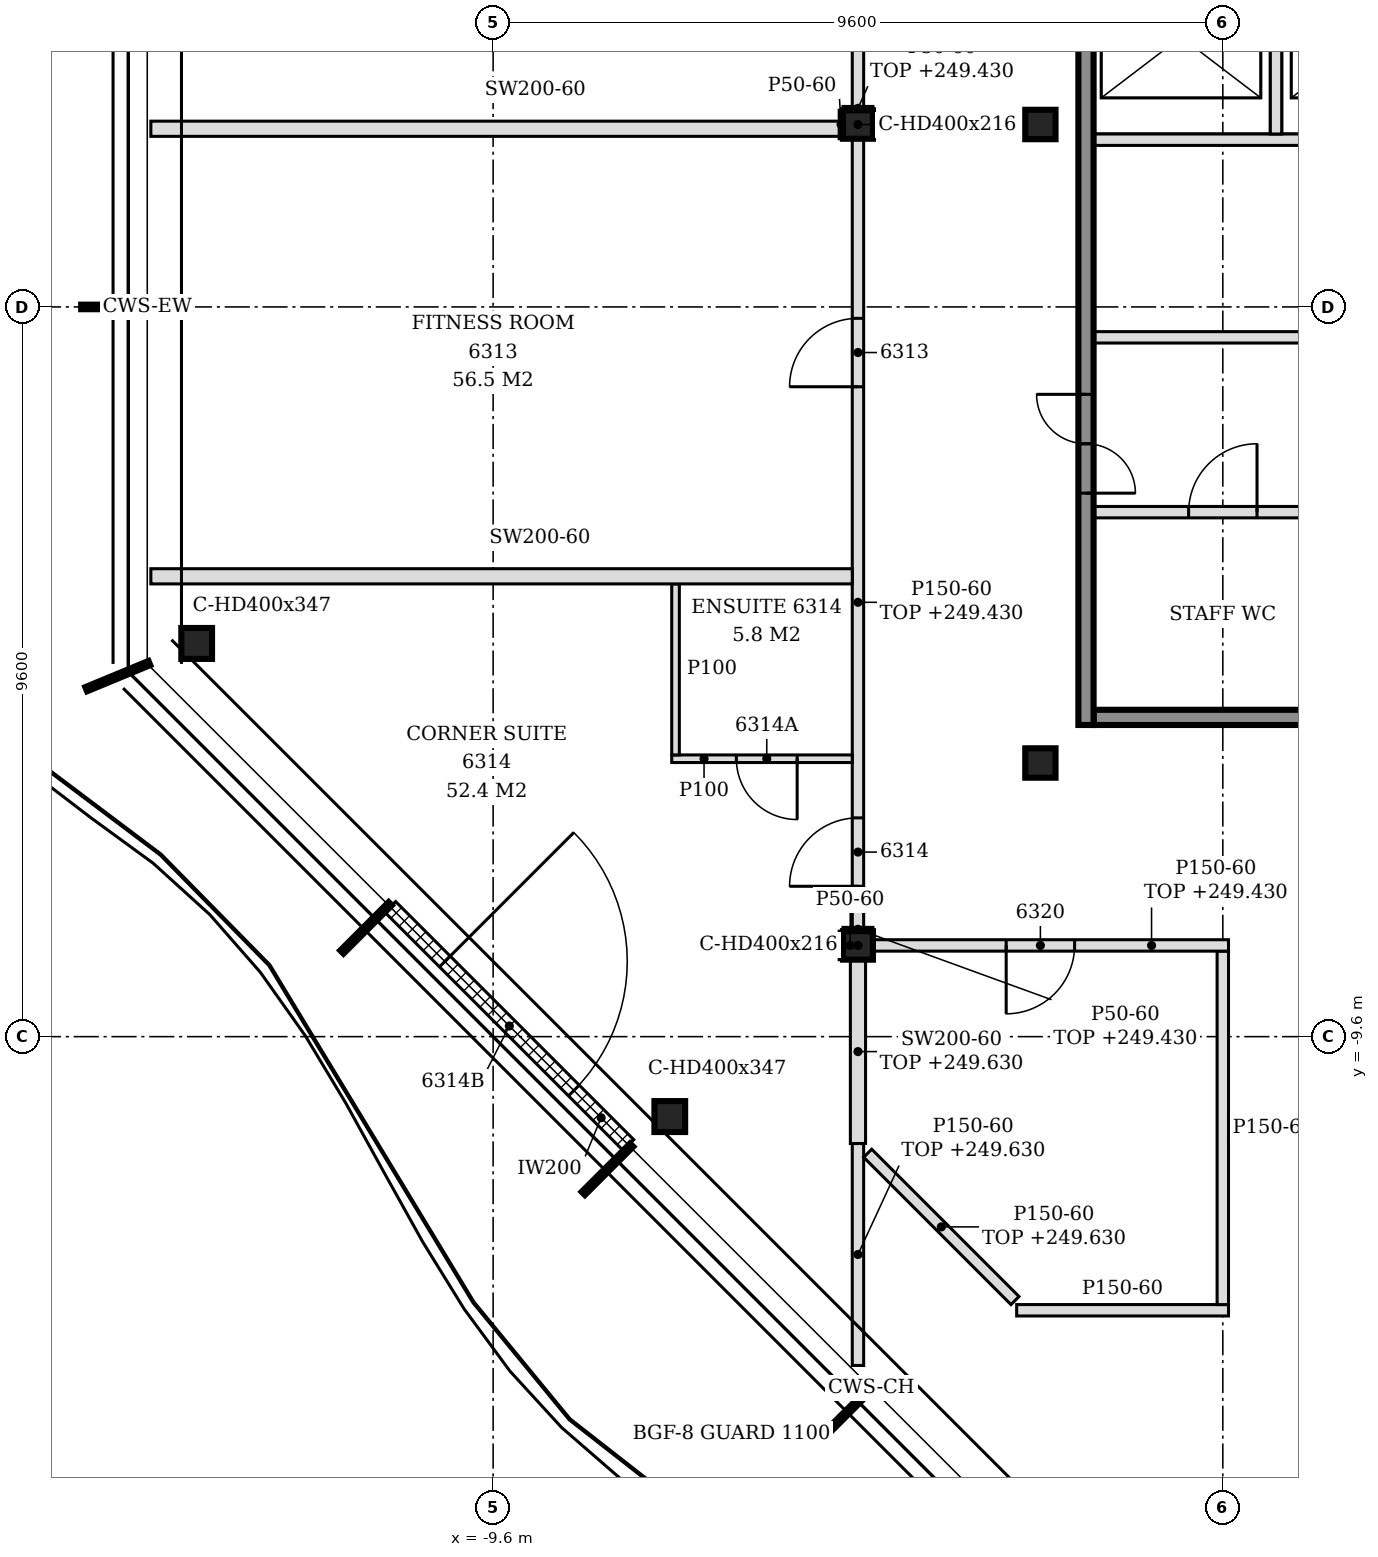
"""IFC4 building model, lengths in metres.
Left out: names, types, materials, properties, quantities, classifications, styles, units other than length and angle.
Written with IfcOpenShell. Run it as: python <this file> out.ifc"""

import sys

from ifc_helpers import new_model, si_unit, direction, frame, frame_2d, origin, origin_2d, place, context, subcontext, project, spatial, polyline, rectangle, i_section, outline, extrude, element, fill, save


model = new_model("IFC4")
c1 = context("Model", 3, precision=1e-05, world=origin(), true_north=direction((0.0, 1.0)))
c2 = subcontext(c1, "Body", "Model", "MODEL_VIEW")
j1 = project(units=[si_unit("LENGTHUNIT", "METRE"), si_unit("PLANEANGLEUNIT", "RADIAN")], contexts=[c1])
p1 = place(None, origin())
s1 = spatial("IfcSite", under=j1, at=p1, CompositionType="ELEMENT")
p2 = place(p1, origin())
s2 = spatial("IfcBuilding", under=s1, at=p2, CompositionType="ELEMENT")
p3 = place(p2, frame((0.0, 0.0, 246.6)))
s3 = spatial("IfcBuildingStorey", under=s2, at=p3, CompositionType="ELEMENT", Elevation=246.6)
for number, where, z_axis, x_axis in (
    (1, (-13.5, -4.427, -0.15), (0.0, 0.0, 1.0), (1.0, 0.0, 0.0)),
    (2, (-7.276, -10.652, -0.15), (0.0, 0.0, 1.0), (1.0, 0.0, 0.0)),
):
    element("IfcColumn", number, at=place(p3, frame(where, z_axis=z_axis, x_axis=x_axis)), inside=s3, PredefinedType="COLUMN", context=c2, shape_type="SweptSolid", body=[
        extrude(i_section(OverallWidth=0.404, OverallDepth=0.407, WebThickness=0.027, FlangeThickness=0.044, FilletRadius=0.015, at=origin_2d()), origin(), (0.0, 0.0, 1.0), 3.6),
    ])
for number, where, z_axis, x_axis in (
    (3, (-4.8, -8.4, -0.15), (0.0, 0.0, 1.0), (1.0, 0.0, 0.0)),
    (4, (-4.8, 2.4, -0.15), (0.0, 0.0, 1.0), (1.0, 0.0, 0.0)),
):
    element("IfcColumn", number, at=place(p3, frame(where, z_axis=z_axis, x_axis=x_axis)), inside=s3, PredefinedType="COLUMN", context=c2, shape_type="SweptSolid", body=[
        extrude(i_section(OverallWidth=0.394, OverallDepth=0.375, WebThickness=0.017, FlangeThickness=0.028, FilletRadius=0.015, at=origin_2d()), origin(), (0.0, 0.0, 1.0), 3.6),
    ])
for number, where, z_axis, x_axis in (
    (5, (-2.4, -6.0, -0.15), (0.0, 0.0, 1.0), (1.0, 0.0, 0.0)),
    (6, (-2.4, 2.4, -0.15), (0.0, 0.0, 1.0), (1.0, 0.0, 0.0)),
):
    element("IfcColumn", number, at=place(p3, frame(where, z_axis=z_axis, x_axis=x_axis)), inside=s3, PredefinedType="COLUMN", context=c2, shape_type="SweptSolid", body=[
        extrude(i_section(OverallWidth=0.398, OverallDepth=0.387, WebThickness=0.021, FlangeThickness=0.033, FilletRadius=0.015, at=origin_2d()), origin(), (0.0, 0.0, 1.0), 3.6),
    ])
p4 = place(p3, frame((-10.953, -7.893, 0.0), z_axis=(0.0, 0.0, 1.0), x_axis=(0.707106781187, -0.707106781187, 0.0)))
e7 = element("IfcWall", 7, at=p4, inside=s3, PredefinedType="NOTDEFINED", context=c2, shape_type="SweptSolid", body=[
    extrude(rectangle(XDim=4.431, YDim=0.2, at=frame_2d((2.215, 0.0))), origin(), (0.0, 0.0, 1.0), 3.45),
])
p5 = place(p4, frame((1.015, 0.0, 0.0)))
e8 = element("IfcOpeningElement", 8, at=p5, cuts=e7, PredefinedType="OPENING", context=c2, shape_type="SweptSolid", body=[
    extrude(rectangle(XDim=2.4, YDim=2.4, at=frame_2d((1.2, 1.2))), frame((0.0, 0.11, 0.0), z_axis=(0.0, -1.0, 0.0), x_axis=(1.0, 0.0, 0.0)), (0.0, 0.0, 1.0), 0.22),
])
p6 = place(p3, frame((-1.7, -5.4, 0.0), z_axis=(0.0, 0.0, 1.0), x_axis=(1.0, 0.0, 0.0)))
e9 = element("IfcWall", 9, at=p6, inside=s3, PredefinedType="SOLIDWALL", context=c2, shape_type="SweptSolid", body=[
    extrude(rectangle(XDim=7.9, YDim=0.2, at=frame_2d((3.95, 0.0))), origin(), (0.0, 0.0, 1.0), 3.45),
])
p7 = place(p3, frame((-1.7, -2.7, 0.0), z_axis=(0.0, 0.0, 1.0), x_axis=(1.0, 0.0, 0.0)))
e10 = element("IfcWall", 10, at=p7, inside=s3, PredefinedType="PARTITIONING", context=c2, shape_type="SweptSolid", body=[
    extrude(rectangle(XDim=7.825, YDim=0.15, at=frame_2d((3.913, 0.0))), origin(), (0.0, 0.0, 1.0), 3.45),
])
p8 = place(p7, frame((1.25, 0.0, 0.0)))
e11 = element("IfcOpeningElement", 11, at=p8, cuts=e10, PredefinedType="OPENING", context=c2, shape_type="SweptSolid", body=[
    extrude(rectangle(XDim=0.9, YDim=2.1, at=frame_2d((0.45, 1.05))), frame((0.0, 0.085, 0.0), z_axis=(0.0, -1.0, 0.0), x_axis=(1.0, 0.0, 0.0)), (0.0, 0.0, 1.0), 0.17),
])
p9 = place(p7, frame((5.25, 0.0, 0.0)))
e12 = element("IfcOpeningElement", 12, at=p9, cuts=e10, PredefinedType="OPENING", context=c2, shape_type="SweptSolid", body=[
    extrude(rectangle(XDim=0.9, YDim=2.1, at=frame_2d((0.45, 1.05))), frame((0.0, 0.085, 0.0), z_axis=(0.0, -1.0, 0.0), x_axis=(1.0, 0.0, 0.0)), (0.0, 0.0, 1.0), 0.17),
])
p10 = place(p3, frame((-1.7, -0.4, 0.0), z_axis=(0.0, 0.0, 1.0), x_axis=(1.0, 0.0, 0.0)))
e13 = element("IfcWall", 13, at=p10, inside=s3, PredefinedType="PARTITIONING", context=c2, shape_type="SweptSolid", body=[
    extrude(rectangle(XDim=10.825, YDim=0.15, at=frame_2d((5.413, 0.0))), origin(), (0.0, 0.0, 1.0), 3.45),
])
p11 = place(p10, frame((4.95, 0.0, 0.0)))
e14 = element("IfcOpeningElement", 14, at=p11, cuts=e13, PredefinedType="OPENING", context=c2, shape_type="SweptSolid", body=[
    extrude(rectangle(XDim=0.9, YDim=2.1, at=frame_2d((0.45, 1.05))), frame((0.0, 0.085, 0.0), z_axis=(0.0, -1.0, 0.0), x_axis=(1.0, 0.0, 0.0)), (0.0, 0.0, 1.0), 0.17),
])
p12 = place(p3, frame((-1.7, 2.2, 0.0), z_axis=(0.0, 0.0, 1.0), x_axis=(1.0, 0.0, 0.0)))
e15 = element("IfcWall", 15, at=p12, inside=s3, PredefinedType="SOLIDWALL", context=c2, shape_type="SweptSolid", body=[
    extrude(rectangle(XDim=4.9, YDim=0.15, at=frame_2d((2.45, 0.0))), origin(), (0.0, 0.0, 1.0), 3.45),
])
p13 = place(p3, frame((-1.8, -5.5, 0.0), z_axis=(0.0, 0.0, 1.0), x_axis=(0.0, 1.0, 0.0)))
e16 = element("IfcWall", 16, at=p13, inside=s3, PredefinedType="SOLIDWALL", context=c2, shape_type="SweptSolid", body=[
    extrude(rectangle(XDim=15.8, YDim=0.2, at=frame_2d((7.9, 0.0))), origin(), (0.0, 0.0, 1.0), 3.45),
])
p14 = place(p13, frame((3.05, 0.0, 0.0)))
e17 = element("IfcOpeningElement", 17, at=p14, cuts=e16, PredefinedType="OPENING", context=c2, shape_type="SweptSolid", body=[
    extrude(rectangle(XDim=1.3, YDim=2.1, at=frame_2d((0.65, 1.05))), frame((0.0, 0.11, 0.0), z_axis=(0.0, -1.0, 0.0), x_axis=(1.0, 0.0, 0.0)), (0.0, 0.0, 1.0), 0.22),
])
p15 = place(p13, frame((11.45, 0.0, 0.0)))
e18 = element("IfcOpeningElement", 18, at=p15, cuts=e16, PredefinedType="OPENING", context=c2, shape_type="SweptSolid", body=[
    extrude(rectangle(XDim=1.3, YDim=2.1, at=frame_2d((0.65, 1.05))), frame((0.0, 0.11, 0.0), z_axis=(0.0, -1.0, 0.0), x_axis=(1.0, 0.0, 0.0)), (0.0, 0.0, 1.0), 0.22),
])
p16 = place(p3, frame((0.7, 2.275, 0.0), z_axis=(0.0, 0.0, 1.0), x_axis=(0.0, 1.0, 0.0)))
e19 = element("IfcWall", 19, at=p16, inside=s3, PredefinedType="SOLIDWALL", context=c2, shape_type="SweptSolid", body=[
    extrude(rectangle(XDim=2.55, YDim=0.15, at=frame_2d((1.275, 0.0))), origin(), (0.0, 0.0, 1.0), 3.45),
])
p17 = place(p3, frame((-4.8, -13.926, 0.0), z_axis=(0.0, 0.0, 1.0), x_axis=(0.0, 1.0, 0.0)))
e20 = element("IfcWall", 20, at=p17, inside=s3, PredefinedType="PARTITIONING", context=c2, shape_type="SweptSolid", body=[
    extrude(outline(polyline([(0.0, 0.0), (2.92, 0.0), (2.92, 3.03), (1.369, 3.03), (1.367, 2.63), (0.229, 2.63), (0.227, 3.03), (0.0, 3.03), (0.0, 0.0)])), frame((0.0, 0.075, 0.0), z_axis=(0.0, -1.0, 0.0), x_axis=(1.0, 0.0, 0.0)), (0.0, 0.0, 1.0), 0.15),
])
p18 = place(p3, frame((-2.712, -13.2, 0.0), z_axis=(0.0, 0.0, 1.0), x_axis=(1.0, 0.0, 0.0)))
e21 = element("IfcWall", 21, at=p18, inside=s3, PredefinedType="PARTITIONING", context=c2, shape_type="SweptSolid", body=[
    extrude(rectangle(XDim=2.787, YDim=0.15, at=frame_2d((1.394, 0.0))), origin(), (0.0, 0.0, 1.0), 3.45),
])
p19 = place(p3, frame((-2.734, -13.072, 0.0), z_axis=(0.0, 0.0, 1.0), x_axis=(-0.707151316332, 0.707062243236, 0.0)))
e22 = element("IfcWall", 22, at=p19, inside=s3, PredefinedType="PARTITIONING", context=c2, shape_type="SweptSolid", body=[
    extrude(rectangle(XDim=2.741, YDim=0.15, at=frame_2d((1.371, 0.0))), origin(), (0.0, 0.0, 1.0), 3.03),
])
p20 = place(p3, frame((0.0, -13.125, 0.0), z_axis=(0.0, 0.0, 1.0), x_axis=(0.0, 1.0, 0.0)))
e23 = element("IfcWall", 23, at=p20, inside=s3, PredefinedType="PARTITIONING", context=c2, shape_type="SweptSolid", body=[
    extrude(outline(polyline([(0.0, 0.0), (4.65, 0.0), (4.65, 2.83), (4.575, 2.83), (4.573, 3.45), (0.0, 3.45), (0.0, 0.0)])), frame((0.0, 0.075, 0.0), z_axis=(0.0, -1.0, 0.0), x_axis=(1.0, 0.0, 0.0)), (0.0, 0.0, 1.0), 0.15),
])
p21 = place(p3, frame((-4.8, -11.006, 0.0), z_axis=(0.0, 0.0, 1.0), x_axis=(0.0, 1.0, 0.0)))
e24 = element("IfcWall", 24, at=p21, inside=s3, PredefinedType="PARTITIONING", context=c2, shape_type="SweptSolid", body=[
    extrude(rectangle(XDim=2.419, YDim=0.2, at=frame_2d((1.209, 0.0))), origin(), (0.0, 0.0, 1.0), 3.03),
])
p22 = place(p3, frame((-4.603, -8.4, 0.0), z_axis=(0.0, 0.0, 1.0), x_axis=(1.0, 0.0, 0.0)))
e25 = element("IfcWall", 25, at=p22, inside=s3, PredefinedType="PARTITIONING", context=c2, shape_type="SweptSolid", body=[
    extrude(rectangle(XDim=4.678, YDim=0.15, at=frame_2d((2.339, 0.0))), origin(), (0.0, 0.0, 1.0), 2.83),
])
p23 = place(p22, frame((1.753, 0.0, 0.0)))
e26 = element("IfcOpeningElement", 26, at=p23, cuts=e25, PredefinedType="OPENING", context=c2, shape_type="SweptSolid", body=[
    extrude(rectangle(XDim=0.9, YDim=2.1, at=frame_2d((0.45, 1.05))), frame((0.0, 0.085, 0.0), z_axis=(0.0, -1.0, 0.0), x_axis=(1.0, 0.0, 0.0)), (0.0, 0.0, 1.0), 0.17),
])
p24 = place(p3, frame((-4.8, -8.212, 0.0), z_axis=(0.0, 0.0, 1.0), x_axis=(0.0, 1.0, 0.0)))
e27 = element("IfcWall", 27, at=p24, inside=s3, PredefinedType="PARTITIONING", context=c2, shape_type="SweptSolid", body=[
    extrude(rectangle(XDim=10.425, YDim=0.15, at=frame_2d((5.212, 0.0))), origin(), (0.0, 0.0, 1.0), 2.83),
])
p25 = place(p24, frame((7.163, 0.0, 0.0)))
e28 = element("IfcOpeningElement", 28, at=p25, cuts=e27, PredefinedType="OPENING", context=c2, shape_type="SweptSolid", body=[
    extrude(rectangle(XDim=0.9, YDim=2.1, at=frame_2d((0.45, 1.05))), frame((0.0, 0.085, 0.0), z_axis=(0.0, -1.0, 0.0), x_axis=(1.0, 0.0, 0.0)), (0.0, 0.0, 1.0), 0.17),
])
p26 = place(p24, frame((0.591, 0.0, 0.0)))
e29 = element("IfcOpeningElement", 29, at=p26, cuts=e27, PredefinedType="OPENING", context=c2, shape_type="SweptSolid", body=[
    extrude(rectangle(XDim=0.9, YDim=2.1, at=frame_2d((0.45, 1.05))), frame((0.0, 0.085, 0.0), z_axis=(0.0, -1.0, 0.0), x_axis=(1.0, 0.0, 0.0)), (0.0, 0.0, 1.0), 0.17),
])
p27 = place(p3, frame((-7.25, -5.944, 0.0), z_axis=(0.0, 0.0, 1.0), x_axis=(1.0, 0.0, 0.0)))
e30 = element("IfcWall", 30, at=p27, inside=s3, PredefinedType="PARTITIONING", context=c2, shape_type="SweptSolid", body=[
    extrude(outline(polyline([(0.0, 0.0), (2.375, 0.0), (2.375, 2.83), (2.3, 2.83), (2.298, 3.45), (0.0, 3.45), (0.0, 0.0)])), frame((0.0, 0.05, 0.0), z_axis=(0.0, -1.0, 0.0), x_axis=(1.0, 0.0, 0.0)), (0.0, 0.0, 1.0), 0.1),
])
p28 = place(p27, frame((0.85, 0.0, 0.0)))
e31 = element("IfcOpeningElement", 31, at=p28, cuts=e30, PredefinedType="OPENING", context=c2, shape_type="SweptSolid", body=[
    extrude(rectangle(XDim=0.8, YDim=2.1, at=frame_2d((0.4, 1.05))), frame((0.0, 0.06, 0.0), z_axis=(0.0, -1.0, 0.0), x_axis=(1.0, 0.0, 0.0)), (0.0, 0.0, 1.0), 0.12),
])
p29 = place(p3, frame((-7.2, -5.894, 0.0), z_axis=(0.0, 0.0, 1.0), x_axis=(0.0, 1.0, 0.0)))
e32 = element("IfcWall", 32, at=p29, inside=s3, PredefinedType="PARTITIONING", context=c2, shape_type="SweptSolid", body=[
    extrude(outline(polyline([(0.0, 0.0), (2.25, 0.0), (2.25, 3.45), (1.189, 3.45), (1.187, 2.98), (0.999, 2.98), (0.997, 3.45), (0.0, 3.45), (0.0, 0.0)])), frame((0.0, 0.05, 0.0), z_axis=(0.0, -1.0, 0.0), x_axis=(1.0, 0.0, 0.0)), (0.0, 0.0, 1.0), 0.1),
])
p30 = place(p3, frame((-14.103, -3.544, 0.0), z_axis=(0.0, 0.0, 1.0), x_axis=(1.0, 0.0, 0.0)))
e33 = element("IfcWall", 33, at=p30, inside=s3, PredefinedType="PARTITIONING", context=c2, shape_type="SweptSolid", body=[
    extrude(outline(polyline([(0.0, 0.0), (9.228, 0.0), (9.228, 2.83), (9.153, 2.83), (9.151, 3.45), (0.753, 3.45), (0.751, 2.93), (0.453, 2.93), (0.451, 3.45), (0.0, 3.45), (0.0, 0.0)])), frame((0.0, 0.1, 0.0), z_axis=(0.0, -1.0, 0.0), x_axis=(1.0, 0.0, 0.0)), (0.0, 0.0, 1.0), 0.2),
])
p31 = place(p3, frame((-14.103, 2.344, 0.0), z_axis=(0.0, 0.0, 1.0), x_axis=(1.0, 0.0, 0.0)))
e34 = element("IfcWall", 34, at=p31, inside=s3, PredefinedType="PARTITIONING", context=c2, shape_type="SweptSolid", body=[
    extrude(outline(polyline([(0.0, 0.0), (9.106, 0.0), (9.106, 3.45), (0.753, 3.45), (0.751, 2.93), (0.453, 2.93), (0.451, 3.45), (0.0, 3.45), (0.0, 0.0)])), frame((0.0, 0.1, 0.0), z_axis=(0.0, -1.0, 0.0), x_axis=(1.0, 0.0, 0.0)), (0.0, 0.0, 1.0), 0.2),
])
p32 = place(p3, frame((-4.8, 2.587, 0.0), z_axis=(0.0, 0.0, 1.0), x_axis=(0.0, 1.0, 0.0)))
e35 = element("IfcWall", 35, at=p32, inside=s3, PredefinedType="PARTITIONING", context=c2, shape_type="SweptSolid", body=[
    extrude(outline(polyline([(0.0, 0.0), (10.425, 0.0), (10.425, 2.63), (9.97, 2.63), (9.968, 2.83), (0.0, 2.83), (0.0, 0.0)])), frame((0.0, 0.075, 0.0), z_axis=(0.0, -1.0, 0.0), x_axis=(1.0, 0.0, 0.0)), (0.0, 0.0, 1.0), 0.15),
])
for number, where, z_axis, x_axis in (
    (36, (-5.022, -8.587, 0.0), (0.0, 0.0, 1.0), (0.0, 1.0, 0.0)),
    (37, (-5.022, 2.212, 0.0), (0.0, 0.0, 1.0), (0.0, 1.0, 0.0)),
):
    element("IfcWall", number, at=place(p3, frame(where, z_axis=z_axis, x_axis=x_axis)), inside=s3, PredefinedType="PARTITIONING", context=c2, shape_type="SweptSolid", body=[
        extrude(rectangle(XDim=0.375, YDim=0.05, at=frame_2d((0.188, 0.0))), origin(), (0.0, 0.0, 1.0), 3.45),
    ])
for number, where, z_axis, x_axis in (
    (38, (-4.997, -8.188, 0.0), (0.0, 0.0, 1.0), (1.0, 0.0, 0.0)),
    (39, (-4.997, 2.613, 0.0), (0.0, 0.0, 1.0), (1.0, 0.0, 0.0)),
):
    element("IfcWall", number, at=place(p3, frame(where, z_axis=z_axis, x_axis=x_axis)), inside=s3, PredefinedType="PARTITIONING", context=c2, shape_type="SweptSolid", body=[
        extrude(rectangle(XDim=0.394, YDim=0.05, at=frame_2d((0.197, 0.0))), origin(), (0.0, 0.0, 1.0), 2.83),
    ])
p33 = place(p5, origin())
e40 = element("IfcDoor", 40, at=p33, inside=s3, OperationType="SINGLE_SWING_LEFT", PredefinedType="DOOR", context=c2, shape_type="SweptSolid", body=[
    extrude(rectangle(XDim=2.4, YDim=2.4, at=frame_2d((1.2, 1.2))), frame((0.0, 0.025, 0.0), z_axis=(0.0, -1.0, 0.0), x_axis=(1.0, 0.0, 0.0)), (0.0, 0.0, 1.0), 0.05),
])
fill(e8, e40)
p34 = place(p14, origin())
e41 = element("IfcDoor", 41, at=p34, inside=s3, OperationType="DOUBLE_DOOR_SINGLE_SWING", PredefinedType="DOOR", context=c2, shape_type="SweptSolid", body=[
    extrude(rectangle(XDim=1.3, YDim=2.1, at=frame_2d((0.65, 1.05))), frame((0.0, 0.025, 0.0), z_axis=(0.0, -1.0, 0.0), x_axis=(1.0, 0.0, 0.0)), (0.0, 0.0, 1.0), 0.05),
])
fill(e17, e41)
p35 = place(p8, origin())
e42 = element("IfcDoor", 42, at=p35, inside=s3, OperationType="SINGLE_SWING_RIGHT", PredefinedType="DOOR", context=c2, shape_type="SweptSolid", body=[
    extrude(rectangle(XDim=0.9, YDim=2.1, at=frame_2d((0.45, 1.05))), frame((0.0, 0.025, 0.0), z_axis=(0.0, -1.0, 0.0), x_axis=(1.0, 0.0, 0.0)), (0.0, 0.0, 1.0), 0.05),
])
fill(e11, e42)
p36 = place(p25, origin())
e43 = element("IfcDoor", 43, at=p36, inside=s3, OperationType="SINGLE_SWING_LEFT", PredefinedType="DOOR", context=c2, shape_type="SweptSolid", body=[
    extrude(rectangle(XDim=0.9, YDim=2.1, at=frame_2d((0.45, 1.05))), frame((0.0, 0.025, 0.0), z_axis=(0.0, -1.0, 0.0), x_axis=(1.0, 0.0, 0.0)), (0.0, 0.0, 1.0), 0.05),
])
fill(e28, e43)
p37 = place(p26, origin())
e44 = element("IfcDoor", 44, at=p37, inside=s3, OperationType="SINGLE_SWING_LEFT", PredefinedType="DOOR", context=c2, shape_type="SweptSolid", body=[
    extrude(rectangle(XDim=0.9, YDim=2.1, at=frame_2d((0.45, 1.05))), frame((0.0, 0.025, 0.0), z_axis=(0.0, -1.0, 0.0), x_axis=(1.0, 0.0, 0.0)), (0.0, 0.0, 1.0), 0.05),
])
fill(e29, e44)
p38 = place(p28, frame((0.8, 0.0, 0.0), z_axis=(0.0, 0.0, 1.0), x_axis=(-1.0, 0.0, 0.0)))
e45 = element("IfcDoor", 45, at=p38, inside=s3, OperationType="SINGLE_SWING_LEFT", PredefinedType="DOOR", context=c2, shape_type="SweptSolid", body=[
    extrude(rectangle(XDim=0.8, YDim=2.1, at=frame_2d((0.4, 1.05))), frame((0.0, 0.025, 0.0), z_axis=(0.0, -1.0, 0.0), x_axis=(1.0, 0.0, 0.0)), (0.0, 0.0, 1.0), 0.05),
])
fill(e31, e45)
p39 = place(p23, frame((0.9, 0.0, 0.0), z_axis=(0.0, 0.0, 1.0), x_axis=(-1.0, 0.0, 0.0)))
e46 = element("IfcDoor", 46, at=p39, inside=s3, OperationType="SINGLE_SWING_RIGHT", PredefinedType="DOOR", context=c2, shape_type="SweptSolid", body=[
    extrude(rectangle(XDim=0.9, YDim=2.1, at=frame_2d((0.45, 1.05))), frame((0.0, 0.025, 0.0), z_axis=(0.0, -1.0, 0.0), x_axis=(1.0, 0.0, 0.0)), (0.0, 0.0, 1.0), 0.05),
])
fill(e26, e46)
save(model, sys.argv[1])
